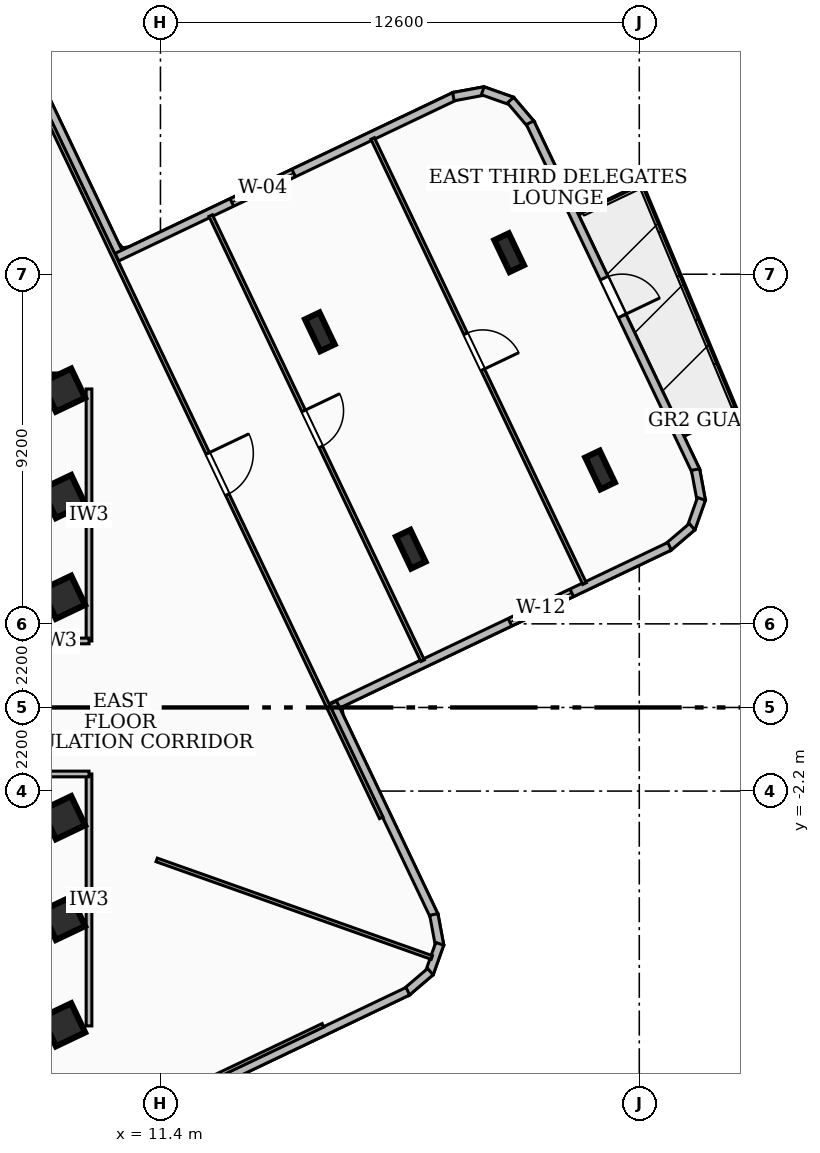
"""IFC4 building model, lengths in metres.
Left out: names, types, materials, properties, quantities, classifications, styles, units other than length and angle.
Written with IfcOpenShell. Run it as: python <this file> out.ifc"""

import sys

from ifc_helpers import new_model, si_unit, direction, frame, frame_2d, origin, origin_2d, place, context, subcontext, project, spatial, rectangle, i_section, extrude, element, fill, save


model = new_model("IFC4")
c1 = context("Model", 3, precision=1e-05, world=origin(), true_north=direction((0.0, 1.0)))
c2 = subcontext(c1, "Body", "Model", "MODEL_VIEW")
j1 = project(units=[si_unit("LENGTHUNIT", "METRE"), si_unit("PLANEANGLEUNIT", "RADIAN")], contexts=[c1])
p1 = place(None, origin())
s1 = spatial("IfcSite", under=j1, at=p1, CompositionType="ELEMENT")
p2 = place(p1, origin())
s2 = spatial("IfcBuilding", under=s1, at=p2, CompositionType="ELEMENT")
p3 = place(p2, frame((0.0, 0.0, 188.28)))
s3 = spatial("IfcBuildingStorey", under=s2, at=p3, CompositionType="ELEMENT", Elevation=188.28)
for number, where, z_axis, x_axis in (
    (1, (-8.78, 8.535, 0.0), (0.0, 0.0, 1.0), (1.0, 0.0, 0.0)),
    (2, (8.78, -8.535, 0.0), (0.0, 0.0, 1.0), (-1.0, 0.0, 0.0)),
):
    element("IfcWall", number, at=place(p3, frame(where, z_axis=z_axis, x_axis=x_axis)), inside=s3, PredefinedType="SHEAR", context=c2, shape_type="SweptSolid", body=[
        extrude(rectangle(XDim=17.56, YDim=0.45, at=frame_2d((8.78, 0.0))), origin(), (0.0, 0.0, 1.0), 4.06),
    ])
for number, where, z_axis, x_axis in (
    (3, (8.85, -5.55, 0.0), (0.0, 0.0, 1.0), (0.903, 0.43, 0.0)),
    (4, (8.85, -2.9, 0.0), (0.0, 0.0, 1.0), (0.903, 0.43, 0.0)),
    (5, (8.85, 2.9, 0.0), (0.0, 0.0, 1.0), (0.903, 0.43, 0.0)),
    (6, (8.85, 5.55, 0.0), (0.0, 0.0, 1.0), (0.903, 0.43, 0.0)),
    (7, (8.85, -8.35, 0.0), (0.0, 0.0, 1.0), (0.903, 0.43, 0.0)),
    (8, (8.85, 8.35, 0.0), (0.0, 0.0, 1.0), (0.903, 0.43, 0.0)),
):
    element("IfcColumn", number, at=place(p3, frame(where, z_axis=z_axis, x_axis=x_axis)), inside=s3, PredefinedType="COLUMN", context=c2, shape_type="SweptSolid", body=[
        extrude(rectangle(XDim=0.85, YDim=0.85, at=origin_2d()), origin(), (0.0, 0.0, 1.0), 4.32),
    ])
for number, where, z_axis, x_axis in (
    (9, (17.987, 4.164, 0.0), (0.0, 0.0, 1.0), (0.903, 0.43, 0.0)),
    (10, (15.594, 9.883, 0.0), (0.0, 0.0, 1.0), (0.903, 0.43, 0.0)),
    (11, (22.968, 6.248, 0.0), (0.0, 0.0, 1.0), (0.903, 0.43, 0.0)),
    (12, (20.576, 11.967, 0.0), (0.0, 0.0, 1.0), (0.903, 0.43, 0.0)),
):
    element("IfcColumn", number, at=place(p3, frame(where, z_axis=z_axis, x_axis=x_axis)), inside=s3, PredefinedType="COLUMN", context=c2, shape_type="SweptSolid", body=[
        extrude(i_section(OverallWidth=0.418, OverallDepth=0.927, WebThickness=0.019, FlangeThickness=0.032, at=origin_2d()), origin(), (0.0, 0.0, 1.0), 4.32),
    ])
p4 = place(p3, frame((7.466, 17.91, 0.0), z_axis=(0.0, 0.0, 1.0), x_axis=(0.429909746524, -0.902871867899, 0.0)))
e13 = element("IfcWall", 13, at=p4, inside=s3, PredefinedType="SOLIDWALL", context=c2, shape_type="SweptSolid", body=[
    extrude(rectangle(XDim=6.76, YDim=0.22, at=frame_2d((3.38, 0.0))), origin(), (0.0, 0.0, 1.0), 4.06),
])
p5 = place(p3, frame((10.255, 11.848, 0.0), z_axis=(0.0, 0.0, 1.0), x_axis=(0.902845413107, 0.429965300962, 0.0)))
e14 = element("IfcWall", 14, at=p5, inside=s3, PredefinedType="SOLIDWALL", context=c2, shape_type="SweptSolid", body=[
    extrude(rectangle(XDim=9.859, YDim=0.22, at=frame_2d((4.929, 0.0))), origin(), (0.0, 0.0, 1.0), 4.06),
])
p6 = place(p5, frame((3.35, 0.0, 0.85)))
e15 = element("IfcOpeningElement", 15, at=p6, cuts=e14, PredefinedType="OPENING", context=c2, shape_type="SweptSolid", body=[
    extrude(rectangle(XDim=1.8, YDim=2.0, at=frame_2d((0.9, 1.0))), frame((0.0, 0.12, 0.0), z_axis=(0.0, -1.0, 0.0), x_axis=(1.0, 0.0, 0.0)), (0.0, 0.0, 1.0), 0.24),
])
p7 = place(p3, frame((19.108, 16.071, 0.0), z_axis=(0.0, 0.0, 1.0), x_axis=(0.983322698467, 0.181869378069, 0.0)))
e16 = element("IfcWall", 16, at=p7, inside=s3, PredefinedType="SOLIDWALL", context=c2, shape_type="SweptSolid", body=[
    extrude(rectangle(XDim=0.835, YDim=0.22, at=frame_2d((0.417, 0.0))), origin(), (0.0, 0.0, 1.0), 4.06),
])
p8 = place(p3, frame((19.88, 16.226, 0.0), z_axis=(0.0, 0.0, 1.0), x_axis=(0.942874853658, -0.333147130168, 0.0)))
e17 = element("IfcWall", 17, at=p8, inside=s3, PredefinedType="SOLIDWALL", context=c2, shape_type="SweptSolid", body=[
    extrude(rectangle(XDim=0.82, YDim=0.22, at=frame_2d((0.41, 0.0))), origin(), (0.0, 0.0, 1.0), 4.06),
])
p9 = place(p3, frame((20.613, 15.98, 0.0), z_axis=(0.0, 0.0, 1.0), x_axis=(0.648522984106, -0.761195072952, 0.0)))
e18 = element("IfcWall", 18, at=p9, inside=s3, PredefinedType="SOLIDWALL", context=c2, shape_type="SweptSolid", body=[
    extrude(rectangle(XDim=0.834, YDim=0.22, at=frame_2d((0.417, 0.0))), origin(), (0.0, 0.0, 1.0), 4.06),
])
p10 = place(p3, frame((21.127, 15.387, 0.0), z_axis=(0.0, 0.0, 1.0), x_axis=(0.429860836932, -0.902895154972, 0.0)))
e19 = element("IfcWall", 19, at=p10, inside=s3, PredefinedType="SOLIDWALL", context=c2, shape_type="SweptSolid", body=[
    extrude(rectangle(XDim=10.162, YDim=0.22, at=frame_2d((5.081, 0.0))), origin(), (0.0, 0.0, 1.0), 4.06),
])
p11 = place(p10, frame((4.531, 0.0, 0.0)))
e20 = element("IfcOpeningElement", 20, at=p11, cuts=e19, PredefinedType="OPENING", context=c2, shape_type="SweptSolid", body=[
    extrude(rectangle(XDim=1.1, YDim=2.1, at=frame_2d((0.55, 1.05))), frame((0.0, 0.12, 0.0), z_axis=(0.0, -1.0, 0.0), x_axis=(1.0, 0.0, 0.0)), (0.0, 0.0, 1.0), 0.24),
])
p12 = place(p3, frame((25.479, 6.26, 0.0), z_axis=(0.0, 0.0, 1.0), x_axis=(0.183282428617, -0.983060298944, 0.0)))
e21 = element("IfcWall", 21, at=p12, inside=s3, PredefinedType="SOLIDWALL", context=c2, shape_type="SweptSolid", body=[
    extrude(rectangle(XDim=0.835, YDim=0.22, at=frame_2d((0.417, 0.0))), origin(), (0.0, 0.0, 1.0), 4.06),
])
p13 = place(p3, frame((25.635, 5.488, 0.0), z_axis=(0.0, 0.0, 1.0), x_axis=(-0.332975902111, -0.94293533639, 0.0)))
e22 = element("IfcWall", 22, at=p13, inside=s3, PredefinedType="SOLIDWALL", context=c2, shape_type="SweptSolid", body=[
    extrude(rectangle(XDim=0.82, YDim=0.22, at=frame_2d((0.41, 0.0))), origin(), (0.0, 0.0, 1.0), 4.06),
])
p14 = place(p3, frame((25.389, 4.755, 0.0), z_axis=(0.0, 0.0, 1.0), x_axis=(-0.76133955124, -0.648353366396, 0.0)))
e23 = element("IfcWall", 23, at=p14, inside=s3, PredefinedType="SOLIDWALL", context=c2, shape_type="SweptSolid", body=[
    extrude(rectangle(XDim=0.834, YDim=0.22, at=frame_2d((0.417, 0.0))), origin(), (0.0, 0.0, 1.0), 4.06),
])
p15 = place(p3, frame((24.796, 4.241, 0.0), z_axis=(0.0, 0.0, 1.0), x_axis=(-0.902859145715, -0.429936463909, 0.0)))
e24 = element("IfcWall", 24, at=p15, inside=s3, PredefinedType="SOLIDWALL", context=c2, shape_type="SweptSolid", body=[
    extrude(rectangle(XDim=9.86, YDim=0.22, at=frame_2d((4.93, 0.0))), origin(), (0.0, 0.0, 1.0), 4.06),
])
p16 = place(p15, frame((2.85, 0.0, 0.85)))
e25 = element("IfcOpeningElement", 25, at=p16, cuts=e24, PredefinedType="OPENING", context=c2, shape_type="SweptSolid", body=[
    extrude(rectangle(XDim=1.8, YDim=1.6, at=frame_2d((0.9, 0.8))), frame((0.0, 0.12, 0.0), z_axis=(0.0, -1.0, 0.0), x_axis=(1.0, 0.0, 0.0)), (0.0, 0.0, 1.0), 0.24),
])
p17 = place(p3, frame((15.935, 0.119, 0.0), z_axis=(0.0, 0.0, 1.0), x_axis=(0.429997588734, -0.902830035878, 0.0)))
e26 = element("IfcWall", 26, at=p17, inside=s3, PredefinedType="SOLIDWALL", context=c2, shape_type="SweptSolid", body=[
    extrude(rectangle(XDim=6.218, YDim=0.22, at=frame_2d((3.109, 0.0))), origin(), (0.0, 0.0, 1.0), 4.06),
])
p18 = place(p3, frame((18.593, -5.447, 0.0), z_axis=(0.0, 0.0, 1.0), x_axis=(0.183282428617, -0.983060298944, 0.0)))
e27 = element("IfcWall", 27, at=p18, inside=s3, PredefinedType="SOLIDWALL", context=c2, shape_type="SweptSolid", body=[
    extrude(rectangle(XDim=0.835, YDim=0.22, at=frame_2d((0.417, 0.0))), origin(), (0.0, 0.0, 1.0), 4.06),
])
p19 = place(p3, frame((18.749, -6.219, 0.0), z_axis=(0.0, 0.0, 1.0), x_axis=(-0.33403451258, -0.942560843875, 0.0)))
e28 = element("IfcWall", 28, at=p19, inside=s3, PredefinedType="SOLIDWALL", context=c2, shape_type="SweptSolid", body=[
    extrude(rectangle(XDim=0.82, YDim=0.22, at=frame_2d((0.41, 0.0))), origin(), (0.0, 0.0, 1.0), 4.06),
])
p20 = place(p3, frame((18.502, -6.952, 0.0), z_axis=(0.0, 0.0, 1.0), x_axis=(-0.76070207285, -0.649101191157, 0.0)))
e29 = element("IfcWall", 29, at=p20, inside=s3, PredefinedType="SOLIDWALL", context=c2, shape_type="SweptSolid", body=[
    extrude(rectangle(XDim=0.833, YDim=0.22, at=frame_2d((0.417, 0.0))), origin(), (0.0, 0.0, 1.0), 4.06),
])
p21 = place(p3, frame((17.91, -7.466, 0.0), z_axis=(0.0, 0.0, 1.0), x_axis=(-0.902871867899, -0.429909746524, 0.0)))
e30 = element("IfcWall", 30, at=p21, inside=s3, PredefinedType="SOLIDWALL", context=c2, shape_type="SweptSolid", body=[
    extrude(rectangle(XDim=6.76, YDim=0.22, at=frame_2d((3.38, 0.0))), origin(), (0.0, 0.0, 1.0), 4.06),
])
p22 = place(p3, frame((9.52, 1.75, 0.0), z_axis=(0.0, 0.0, 1.0), x_axis=(0.0, 1.0, 0.0)))
e31 = element("IfcWall", 31, at=p22, inside=s3, PredefinedType="PARTITIONING", context=c2, shape_type="SweptSolid", body=[
    extrude(rectangle(XDim=6.63, YDim=0.15, at=frame_2d((3.315, 0.0))), origin(), (0.0, 0.0, 1.0), 3.364),
])
p23 = place(p3, frame((7.85, 1.75, 0.0), z_axis=(0.0, 0.0, 1.0), x_axis=(1.0, 0.0, 0.0)))
e32 = element("IfcWall", 32, at=p23, inside=s3, PredefinedType="PARTITIONING", context=c2, shape_type="SweptSolid", body=[
    extrude(rectangle(XDim=1.67, YDim=0.15, at=frame_2d((0.835, 0.0))), origin(), (0.0, 0.0, 1.0), 3.29),
])
p24 = place(p3, frame((9.52, -8.38, 0.0), z_axis=(0.0, 0.0, 1.0), x_axis=(0.0, 1.0, 0.0)))
e33 = element("IfcWall", 33, at=p24, inside=s3, PredefinedType="PARTITIONING", context=c2, shape_type="SweptSolid", body=[
    extrude(rectangle(XDim=6.63, YDim=0.15, at=frame_2d((3.315, 0.0))), origin(), (0.0, 0.0, 1.0), 4.06),
])
p25 = place(p3, frame((7.85, -1.75, 0.0), z_axis=(0.0, 0.0, 1.0), x_axis=(1.0, 0.0, 0.0)))
e34 = element("IfcWall", 34, at=p25, inside=s3, PredefinedType="PARTITIONING", context=c2, shape_type="SweptSolid", body=[
    extrude(rectangle(XDim=1.67, YDim=0.15, at=frame_2d((0.835, 0.0))), origin(), (0.0, 0.0, 1.0), 3.29),
])
p26 = place(p3, frame((11.3, -4.011, 0.0), z_axis=(0.0, 0.0, 1.0), x_axis=(0.942439374513, -0.334377070636, 0.0)))
e35 = element("IfcWall", 35, at=p26, inside=s3, PredefinedType="PARTITIONING", context=c2, shape_type="SweptSolid", body=[
    extrude(rectangle(XDim=7.683, YDim=0.1, at=frame_2d((3.842, 0.0))), origin(), (0.0, 0.0, 1.0), 4.06),
])
p27 = place(p3, frame((8.362, 15.677, 0.0), z_axis=(0.0, 0.0, 1.0), x_axis=(0.429924831179, -0.902864685064, 0.0)))
e36 = element("IfcWall", 36, at=p27, inside=s3, PredefinedType="PARTITIONING", context=c2, shape_type="SweptSolid", body=[
    extrude(rectangle(XDim=20.58, YDim=0.1, at=frame_2d((10.29, 0.0))), origin(), (0.0, 0.0, 1.0), 3.364),
])
p28 = place(p27, frame((9.96, 0.0, 0.0)))
e37 = element("IfcOpeningElement", 37, at=p28, cuts=e36, PredefinedType="OPENING", context=c2, shape_type="SweptSolid", body=[
    extrude(rectangle(XDim=1.2, YDim=2.1, at=frame_2d((0.6, 1.05))), frame((0.0, 0.06, 0.0), z_axis=(0.0, -1.0, 0.0), x_axis=(1.0, 0.0, 0.0)), (0.0, 0.0, 1.0), 0.12),
])
p29 = place(p3, frame((12.722, 12.941, 0.0), z_axis=(0.0, 0.0, 1.0), x_axis=(0.429933580392, -0.902860518824, 0.0)))
e38 = element("IfcWall", 38, at=p29, inside=s3, PredefinedType="PARTITIONING", context=c2, shape_type="SweptSolid", body=[
    extrude(rectangle(XDim=12.97, YDim=0.1, at=frame_2d((6.485, 0.0))), origin(), (0.0, 0.0, 1.0), 3.364),
])
p30 = place(p29, frame((5.69, 0.0, 0.0)))
e39 = element("IfcOpeningElement", 39, at=p30, cuts=e38, PredefinedType="OPENING", context=c2, shape_type="SweptSolid", body=[
    extrude(rectangle(XDim=1.05, YDim=2.08, at=frame_2d((0.525, 1.04))), frame((0.0, 0.06, 0.0), z_axis=(0.0, -1.0, 0.0), x_axis=(1.0, 0.0, 0.0)), (0.0, 0.0, 1.0), 0.12),
])
p31 = place(p3, frame((16.984, 14.97, 0.0), z_axis=(0.0, 0.0, 1.0), x_axis=(0.429933580392, -0.902860518824, 0.0)))
e40 = element("IfcWall", 40, at=p31, inside=s3, PredefinedType="PARTITIONING", context=c2, shape_type="SweptSolid", body=[
    extrude(rectangle(XDim=12.97, YDim=0.1, at=frame_2d((6.485, 0.0))), origin(), (0.0, 0.0, 1.0), 3.364),
])
p32 = place(p31, frame((5.69, 0.0, 0.0)))
e41 = element("IfcOpeningElement", 41, at=p32, cuts=e40, PredefinedType="OPENING", context=c2, shape_type="SweptSolid", body=[
    extrude(rectangle(XDim=1.05, YDim=2.08, at=frame_2d((0.525, 1.04))), frame((0.0, 0.06, 0.0), z_axis=(0.0, -1.0, 0.0), x_axis=(1.0, 0.0, 0.0)), (0.0, 0.0, 1.0), 0.12),
])
p33 = place(p3, frame((15.677, -8.362, 0.0), z_axis=(0.0, 0.0, 1.0), x_axis=(-0.902864685064, -0.429924831179, 0.0)))
e42 = element("IfcWall", 42, at=p33, inside=s3, PredefinedType="PARTITIONING", context=c2, shape_type="SweptSolid", body=[
    extrude(rectangle(XDim=20.58, YDim=0.1, at=frame_2d((10.29, 0.0))), origin(), (0.0, 0.0, 1.0), 3.364),
])
p34 = place(p33, frame((9.96, 0.0, 0.0)))
e43 = element("IfcOpeningElement", 43, at=p34, cuts=e42, PredefinedType="OPENING", context=c2, shape_type="SweptSolid", body=[
    extrude(rectangle(XDim=1.2, YDim=2.1, at=frame_2d((0.6, 1.05))), frame((0.0, 0.06, 0.0), z_axis=(0.0, -1.0, 0.0), x_axis=(1.0, 0.0, 0.0)), (0.0, 0.0, 1.0), 0.12),
])
p35 = place(p6, origin())
e44 = element("IfcWindow", 44, at=p35, inside=s3, PartitioningType="SINGLE_PANEL", PredefinedType="WINDOW", context=c2, shape_type="SweptSolid", body=[
    extrude(rectangle(XDim=1.8, YDim=2.0, at=frame_2d((0.9, 1.0))), frame((0.0, 0.03, 0.0), z_axis=(0.0, -1.0, 0.0), x_axis=(1.0, 0.0, 0.0)), (0.0, 0.0, 1.0), 0.06),
])
fill(e15, e44)
p36 = place(p11, origin())
e45 = element("IfcDoor", 45, at=p36, inside=s3, OperationType="SINGLE_SWING_RIGHT", PredefinedType="DOOR", context=c2, shape_type="SweptSolid", body=[
    extrude(rectangle(XDim=1.1, YDim=2.1, at=frame_2d((0.55, 1.05))), frame((0.0, 0.025, 0.0), z_axis=(0.0, -1.0, 0.0), x_axis=(1.0, 0.0, 0.0)), (0.0, 0.0, 1.0), 0.05),
])
fill(e20, e45)
p37 = place(p16, origin())
e46 = element("IfcWindow", 46, at=p37, inside=s3, PartitioningType="SINGLE_PANEL", PredefinedType="WINDOW", context=c2, shape_type="SweptSolid", body=[
    extrude(rectangle(XDim=1.8, YDim=1.6, at=frame_2d((0.9, 0.8))), frame((0.0, 0.03, 0.0), z_axis=(0.0, -1.0, 0.0), x_axis=(1.0, 0.0, 0.0)), (0.0, 0.0, 1.0), 0.06),
])
fill(e25, e46)
p38 = place(p28, origin())
e47 = element("IfcDoor", 47, at=p38, inside=s3, OperationType="SINGLE_SWING_LEFT", PredefinedType="DOOR", context=c2, shape_type="SweptSolid", body=[
    extrude(rectangle(XDim=1.2, YDim=2.1, at=frame_2d((0.6, 1.05))), frame((0.0, 0.025, 0.0), z_axis=(0.0, -1.0, 0.0), x_axis=(1.0, 0.0, 0.0)), (0.0, 0.0, 1.0), 0.05),
])
fill(e37, e47)
p39 = place(p30, origin())
e48 = element("IfcDoor", 48, at=p39, inside=s3, OperationType="SINGLE_SWING_LEFT", PredefinedType="DOOR", context=c2, shape_type="SweptSolid", body=[
    extrude(rectangle(XDim=1.05, YDim=2.08, at=frame_2d((0.525, 1.04))), frame((0.0, 0.025, 0.0), z_axis=(0.0, -1.0, 0.0), x_axis=(1.0, 0.0, 0.0)), (0.0, 0.0, 1.0), 0.05),
])
fill(e39, e48)
p40 = place(p32, origin())
e49 = element("IfcDoor", 49, at=p40, inside=s3, OperationType="SINGLE_SWING_RIGHT", PredefinedType="DOOR", context=c2, shape_type="SweptSolid", body=[
    extrude(rectangle(XDim=1.05, YDim=2.08, at=frame_2d((0.525, 1.04))), frame((0.0, 0.025, 0.0), z_axis=(0.0, -1.0, 0.0), x_axis=(1.0, 0.0, 0.0)), (0.0, 0.0, 1.0), 0.05),
])
fill(e41, e49)
save(model, sys.argv[1])
